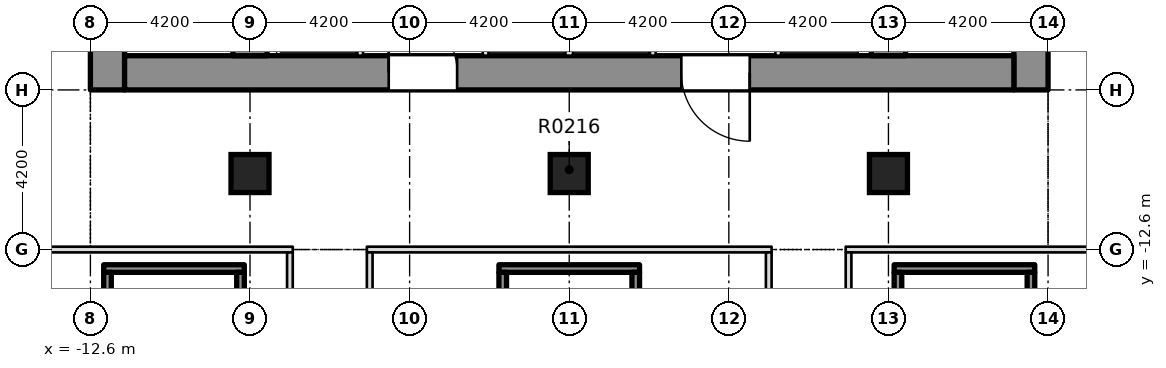
"""IFC4 building model, lengths in metres.
Left out: names, types, materials, properties, quantities, classifications, styles, units other than length and angle.
Written with IfcOpenShell. Run it as: python <this file> out.ifc"""

import sys

from ifc_helpers import new_model, si_unit, direction, frame, frame_2d, origin, origin_2d, place, context, subcontext, project, spatial, rectangle, extrude, element, fill, save


model = new_model("IFC4")
c1 = context("Model", 3, precision=1e-05, world=origin(), true_north=direction((0.0, 1.0)))
c2 = subcontext(c1, "Body", "Model", "MODEL_VIEW")
j1 = project(units=[si_unit("LENGTHUNIT", "METRE"), si_unit("PLANEANGLEUNIT", "RADIAN")], contexts=[c1])
p1 = place(None, origin())
s1 = spatial("IfcSite", under=j1, at=p1, CompositionType="ELEMENT")
p2 = place(p1, origin())
s2 = spatial("IfcBuilding", under=s1, at=p2, CompositionType="ELEMENT")
p3 = place(p2, frame((0.0, 0.0, 12.5)))
s3 = spatial("IfcBuildingStorey", under=s2, at=p3, CompositionType="ELEMENT", Elevation=12.5)
p4 = place(p3, frame((12.15, -8.4, -0.4), z_axis=(0.0, 0.0, 1.0), x_axis=(0.0, 1.0, 0.0)))
e1 = element("IfcWall", 1, at=p4, inside=s3, PredefinedType="SHEAR", context=c2, shape_type="SweptSolid", body=[
    extrude(rectangle(XDim=30.15, YDim=0.9, at=frame_2d((15.075, 0.0))), origin(), (0.0, 0.0, 1.0), 7.5),
])
p5 = place(p4, frame((3.425, 0.0, 0.4)))
e2 = element("IfcOpeningElement", 2, at=p5, cuts=e1, PredefinedType="OPENING", context=c2, shape_type="SweptSolid", body=[
    extrude(rectangle(XDim=0.95, YDim=2.1, at=frame_2d((0.475, 1.05))), frame((0.0, 0.46, 0.0), z_axis=(0.0, -1.0, 0.0), x_axis=(1.0, 0.0, 0.0)), (0.0, 0.0, 1.0), 0.92),
])
p6 = place(p4, frame((8.075, 0.0, 0.4)))
e3 = element("IfcOpeningElement", 3, at=p6, cuts=e1, PredefinedType="OPENING", context=c2, shape_type="SweptSolid", body=[
    extrude(rectangle(XDim=0.95, YDim=2.1, at=frame_2d((0.475, 1.05))), frame((0.0, 0.46, 0.0), z_axis=(0.0, -1.0, 0.0), x_axis=(1.0, 0.0, 0.0)), (0.0, 0.0, 1.0), 0.92),
])
p7 = place(p4, frame((11.425, 0.0, 0.4)))
e4 = element("IfcOpeningElement", 4, at=p7, cuts=e1, PredefinedType="OPENING", context=c2, shape_type="SweptSolid", body=[
    extrude(rectangle(XDim=0.95, YDim=2.1, at=frame_2d((0.475, 1.05))), frame((0.0, 0.46, 0.0), z_axis=(0.0, -1.0, 0.0), x_axis=(1.0, 0.0, 0.0)), (0.0, 0.0, 1.0), 0.92),
])
p8 = place(p4, frame((15.625, 0.0, 0.4)))
e5 = element("IfcOpeningElement", 5, at=p8, cuts=e1, PredefinedType="OPENING", context=c2, shape_type="SweptSolid", body=[
    extrude(rectangle(XDim=0.95, YDim=2.1, at=frame_2d((0.475, 1.05))), frame((0.0, 0.46, 0.0), z_axis=(0.0, -1.0, 0.0), x_axis=(1.0, 0.0, 0.0)), (0.0, 0.0, 1.0), 0.92),
])
p9 = place(p4, frame((22.725, 0.0, 0.4)))
e6 = element("IfcOpeningElement", 6, at=p9, cuts=e1, PredefinedType="OPENING", context=c2, shape_type="SweptSolid", body=[
    extrude(rectangle(XDim=0.95, YDim=2.1, at=frame_2d((0.475, 1.05))), frame((0.0, 0.46, 0.0), z_axis=(0.0, -1.0, 0.0), x_axis=(1.0, 0.0, 0.0)), (0.0, 0.0, 1.0), 0.92),
])
p10 = place(p4, frame((26.75, 0.0, 0.4)))
e7 = element("IfcOpeningElement", 7, at=p10, cuts=e1, PredefinedType="OPENING", context=c2, shape_type="SweptSolid", body=[
    extrude(rectangle(XDim=0.95, YDim=2.1, at=frame_2d((0.475, 1.05))), frame((0.0, 0.46, 0.0), z_axis=(0.0, -1.0, 0.0), x_axis=(1.0, 0.0, 0.0)), (0.0, 0.0, 1.0), 0.92),
])
p11 = place(p4, frame((19.3, 0.0, 0.4)))
e8 = element("IfcOpeningElement", 8, at=p11, cuts=e1, PredefinedType="OPENING", context=c2, shape_type="SweptSolid", body=[
    extrude(rectangle(XDim=1.2, YDim=2.1, at=frame_2d((0.6, 1.05))), frame((0.0, 0.46, 0.0), z_axis=(0.0, -1.0, 0.0), x_axis=(1.0, 0.0, 0.0)), (0.0, 0.0, 1.0), 0.92),
])
p12 = place(p3, frame((-12.15, -8.4, -0.4), z_axis=(0.0, 0.0, 1.0), x_axis=(0.0, 1.0, 0.0)))
e9 = element("IfcWall", 9, at=p12, inside=s3, PredefinedType="SHEAR", context=c2, shape_type="SweptSolid", body=[
    extrude(rectangle(XDim=30.15, YDim=0.9, at=frame_2d((15.075, 0.0))), origin(), (0.0, 0.0, 1.0), 7.5),
])
p13 = place(p12, frame((2.925, 0.0, 0.4)))
e10 = element("IfcOpeningElement", 10, at=p13, cuts=e9, PredefinedType="OPENING", context=c2, shape_type="SweptSolid", body=[
    extrude(rectangle(XDim=0.95, YDim=2.1, at=frame_2d((0.475, 1.05))), frame((0.0, 0.46, 0.0), z_axis=(0.0, -1.0, 0.0), x_axis=(1.0, 0.0, 0.0)), (0.0, 0.0, 1.0), 0.92),
])
p14 = place(p12, frame((7.025, 0.0, 0.4)))
e11 = element("IfcOpeningElement", 11, at=p14, cuts=e9, PredefinedType="OPENING", context=c2, shape_type="SweptSolid", body=[
    extrude(rectangle(XDim=0.95, YDim=2.1, at=frame_2d((0.475, 1.05))), frame((0.0, 0.46, 0.0), z_axis=(0.0, -1.0, 0.0), x_axis=(1.0, 0.0, 0.0)), (0.0, 0.0, 1.0), 0.92),
])
p15 = place(p12, frame((10.875, 0.0, 0.4)))
e12 = element("IfcOpeningElement", 12, at=p15, cuts=e9, PredefinedType="OPENING", context=c2, shape_type="SweptSolid", body=[
    extrude(rectangle(XDim=0.95, YDim=2.1, at=frame_2d((0.475, 1.05))), frame((0.0, 0.46, 0.0), z_axis=(0.0, -1.0, 0.0), x_axis=(1.0, 0.0, 0.0)), (0.0, 0.0, 1.0), 0.92),
])
p16 = place(p12, frame((15.625, 0.0, 0.4)))
e13 = element("IfcOpeningElement", 13, at=p16, cuts=e9, PredefinedType="OPENING", context=c2, shape_type="SweptSolid", body=[
    extrude(rectangle(XDim=0.95, YDim=2.1, at=frame_2d((0.475, 1.05))), frame((0.0, 0.46, 0.0), z_axis=(0.0, -1.0, 0.0), x_axis=(1.0, 0.0, 0.0)), (0.0, 0.0, 1.0), 0.92),
])
p17 = place(p12, frame((24.75, 0.0, 0.4)))
e14 = element("IfcOpeningElement", 14, at=p17, cuts=e9, PredefinedType="OPENING", context=c2, shape_type="SweptSolid", body=[
    extrude(rectangle(XDim=0.95, YDim=2.1, at=frame_2d((0.475, 1.05))), frame((0.0, 0.46, 0.0), z_axis=(0.0, -1.0, 0.0), x_axis=(1.0, 0.0, 0.0)), (0.0, 0.0, 1.0), 0.92),
])
p18 = place(p12, frame((19.3, 0.0, 0.4)))
e15 = element("IfcOpeningElement", 15, at=p18, cuts=e9, PredefinedType="OPENING", context=c2, shape_type="SweptSolid", body=[
    extrude(rectangle(XDim=1.2, YDim=2.1, at=frame_2d((0.6, 1.05))), frame((0.0, 0.46, 0.0), z_axis=(0.0, -1.0, 0.0), x_axis=(1.0, 0.0, 0.0)), (0.0, 0.0, 1.0), 0.92),
])
p19 = place(p3, frame((-11.7, -7.95, -0.4), z_axis=(0.0, 0.0, 1.0), x_axis=(1.0, 0.0, 0.0)))
e16 = element("IfcWall", 16, at=p19, inside=s3, PredefinedType="SHEAR", context=c2, shape_type="SweptSolid", body=[
    extrude(rectangle(XDim=23.4, YDim=0.9, at=frame_2d((11.7, 0.0))), origin(), (0.0, 0.0, 1.0), 7.5),
])
p20 = place(p19, frame((6.95, 0.0, 0.4)))
e17 = element("IfcOpeningElement", 17, at=p20, cuts=e16, PredefinedType="OPENING", context=c2, shape_type="SweptSolid", body=[
    extrude(rectangle(XDim=1.8, YDim=2.1, at=frame_2d((0.9, 1.05))), frame((0.0, 0.46, 0.0), z_axis=(0.0, -1.0, 0.0), x_axis=(1.0, 0.0, 0.0)), (0.0, 0.0, 1.0), 0.92),
])
p21 = place(p19, frame((14.65, 0.0, 0.4)))
e18 = element("IfcOpeningElement", 18, at=p21, cuts=e16, PredefinedType="OPENING", context=c2, shape_type="SweptSolid", body=[
    extrude(rectangle(XDim=1.8, YDim=2.1, at=frame_2d((0.9, 1.05))), frame((0.0, 0.46, 0.0), z_axis=(0.0, -1.0, 0.0), x_axis=(1.0, 0.0, 0.0)), (0.0, 0.0, 1.0), 0.92),
])
p22 = place(p3, frame((-8.4, -7.5, -0.4), z_axis=(0.0, 0.0, 1.0), x_axis=(0.0, 1.0, 0.0)))
e19 = element("IfcWall", 19, at=p22, inside=s3, PredefinedType="SHEAR", context=c2, shape_type="SweptSolid", body=[
    extrude(rectangle(XDim=28.35, YDim=0.9, at=frame_2d((14.175, 0.0))), origin(), (0.0, 0.0, 1.0), 7.5),
])
p23 = place(p22, frame((18.4, 0.0, 0.4)))
e20 = element("IfcOpeningElement", 20, at=p23, cuts=e19, PredefinedType="OPENING", context=c2, shape_type="SweptSolid", body=[
    extrude(rectangle(XDim=1.2, YDim=2.1, at=frame_2d((0.6, 1.05))), frame((0.0, 0.46, 0.0), z_axis=(0.0, -1.0, 0.0), x_axis=(1.0, 0.0, 0.0)), (0.0, 0.0, 1.0), 0.92),
])
p24 = place(p3, frame((8.4, -7.5, -0.4), z_axis=(0.0, 0.0, 1.0), x_axis=(0.0, 1.0, 0.0)))
e21 = element("IfcWall", 21, at=p24, inside=s3, PredefinedType="SHEAR", context=c2, shape_type="SweptSolid", body=[
    extrude(rectangle(XDim=28.35, YDim=0.9, at=frame_2d((14.175, 0.0))), origin(), (0.0, 0.0, 1.0), 7.5),
])
p25 = place(p24, frame((18.4, 0.0, 0.4)))
e22 = element("IfcOpeningElement", 22, at=p25, cuts=e21, PredefinedType="OPENING", context=c2, shape_type="SweptSolid", body=[
    extrude(rectangle(XDim=1.2, YDim=2.1, at=frame_2d((0.6, 1.05))), frame((0.0, 0.46, 0.0), z_axis=(0.0, -1.0, 0.0), x_axis=(1.0, 0.0, 0.0)), (0.0, 0.0, 1.0), 0.92),
])
for number, where, z_axis, x_axis in (
    (23, (-8.4, -10.6, -0.4), (0.0, 0.0, 1.0), (1.0, 0.0, 0.0)),
    (24, (0.0, -10.6, -0.4), (0.0, 0.0, 1.0), (1.0, 0.0, 0.0)),
    (25, (8.4, -10.6, -0.4), (0.0, 0.0, 1.0), (1.0, 0.0, 0.0)),
):
    element("IfcColumn", number, at=place(p3, frame(where, z_axis=z_axis, x_axis=x_axis)), inside=s3, PredefinedType="COLUMN", context=c2, shape_type="SweptSolid", body=[
        extrude(rectangle(XDim=1.0, YDim=1.0, at=origin_2d()), origin(), (0.0, 0.0, 1.0), 7.5),
    ])
p26 = place(p3, frame((-16.9, -12.6, 0.0), z_axis=(0.0, 0.0, 1.0), x_axis=(1.0, 0.0, 0.0)))
e26 = element("IfcWall", 26, at=p26, inside=s3, PredefinedType="PARTITIONING", context=c2, shape_type="SweptSolid", body=[
    extrude(rectangle(XDim=9.625, YDim=0.15, at=frame_2d((4.812, 0.0))), origin(), (0.0, 0.0, 1.0), 7.1),
])
p27 = place(p3, frame((-5.325, -12.6, 0.0), z_axis=(0.0, 0.0, 1.0), x_axis=(1.0, 0.0, 0.0)))
e27 = element("IfcWall", 27, at=p27, inside=s3, PredefinedType="PARTITIONING", context=c2, shape_type="SweptSolid", body=[
    extrude(rectangle(XDim=10.65, YDim=0.15, at=frame_2d((5.325, 0.0))), origin(), (0.0, 0.0, 1.0), 7.1),
])
p28 = place(p3, frame((7.275, -12.6, 0.0), z_axis=(0.0, 0.0, 1.0), x_axis=(1.0, 0.0, 0.0)))
e28 = element("IfcWall", 28, at=p28, inside=s3, PredefinedType="PARTITIONING", context=c2, shape_type="SweptSolid", body=[
    extrude(rectangle(XDim=9.625, YDim=0.15, at=frame_2d((4.812, 0.0))), origin(), (0.0, 0.0, 1.0), 7.1),
])
for number, where, z_axis, x_axis in (
    (29, (-7.35, -18.125, 0.0), (0.0, 0.0, 1.0), (0.0, 1.0, 0.0)),
    (30, (-5.25, -18.125, 0.0), (0.0, 0.0, 1.0), (0.0, 1.0, 0.0)),
    (31, (5.25, -18.125, 0.0), (0.0, 0.0, 1.0), (0.0, 1.0, 0.0)),
    (32, (7.35, -18.125, 0.0), (0.0, 0.0, 1.0), (0.0, 1.0, 0.0)),
):
    element("IfcWall", number, at=place(p3, frame(where, z_axis=z_axis, x_axis=x_axis)), inside=s3, PredefinedType="PARTITIONING", context=c2, shape_type="SweptSolid", body=[
        extrude(rectangle(XDim=5.45, YDim=0.15, at=frame_2d((2.725, 0.0))), origin(), (0.0, 0.0, 1.0), 7.1),
    ])
p29 = place(p3, frame((-5.5, -7.499, 0.0), z_axis=(0.0, 0.0, 1.0), x_axis=(0.0, 1.0, 0.0)))
e33 = element("IfcWall", 33, at=p29, inside=s3, PredefinedType="PARTITIONING", context=c2, shape_type="SweptSolid", body=[
    extrude(rectangle(XDim=11.924, YDim=0.15, at=frame_2d((5.962, 0.0))), origin(), (0.0, 0.0, 1.0), 7.1),
])
p30 = place(p29, frame((0.949, 0.0, 0.0)))
e34 = element("IfcOpeningElement", 34, at=p30, cuts=e33, PredefinedType="OPENING", context=c2, shape_type="SweptSolid", body=[
    extrude(rectangle(XDim=1.1, YDim=2.1, at=frame_2d((0.55, 1.05))), frame((0.0, 0.085, 0.0), z_axis=(0.0, -1.0, 0.0), x_axis=(1.0, 0.0, 0.0)), (0.0, 0.0, 1.0), 0.17),
])
p31 = place(p29, frame((3.949, 0.0, 0.0)))
e35 = element("IfcOpeningElement", 35, at=p31, cuts=e33, PredefinedType="OPENING", context=c2, shape_type="SweptSolid", body=[
    extrude(rectangle(XDim=1.1, YDim=2.1, at=frame_2d((0.55, 1.05))), frame((0.0, 0.085, 0.0), z_axis=(0.0, -1.0, 0.0), x_axis=(1.0, 0.0, 0.0)), (0.0, 0.0, 1.0), 0.17),
])
p32 = place(p29, frame((6.949, 0.0, 0.0)))
e36 = element("IfcOpeningElement", 36, at=p32, cuts=e33, PredefinedType="OPENING", context=c2, shape_type="SweptSolid", body=[
    extrude(rectangle(XDim=1.1, YDim=2.1, at=frame_2d((0.55, 1.05))), frame((0.0, 0.085, 0.0), z_axis=(0.0, -1.0, 0.0), x_axis=(1.0, 0.0, 0.0)), (0.0, 0.0, 1.0), 0.17),
])
p33 = place(p29, frame((9.949, 0.0, 0.0)))
e37 = element("IfcOpeningElement", 37, at=p33, cuts=e33, PredefinedType="OPENING", context=c2, shape_type="SweptSolid", body=[
    extrude(rectangle(XDim=1.1, YDim=2.1, at=frame_2d((0.55, 1.05))), frame((0.0, 0.085, 0.0), z_axis=(0.0, -1.0, 0.0), x_axis=(1.0, 0.0, 0.0)), (0.0, 0.0, 1.0), 0.17),
])
p34 = place(p3, frame((-2.2, -7.499, 0.0), z_axis=(0.0, 0.0, 1.0), x_axis=(0.0, 1.0, 0.0)))
e38 = element("IfcWall", 38, at=p34, inside=s3, PredefinedType="PARTITIONING", context=c2, shape_type="SweptSolid", body=[
    extrude(rectangle(XDim=11.924, YDim=0.15, at=frame_2d((5.962, 0.0))), origin(), (0.0, 0.0, 1.0), 7.1),
])
p35 = place(p34, frame((0.949, 0.0, 0.0)))
e39 = element("IfcOpeningElement", 39, at=p35, cuts=e38, PredefinedType="OPENING", context=c2, shape_type="SweptSolid", body=[
    extrude(rectangle(XDim=1.1, YDim=2.1, at=frame_2d((0.55, 1.05))), frame((0.0, 0.085, 0.0), z_axis=(0.0, -1.0, 0.0), x_axis=(1.0, 0.0, 0.0)), (0.0, 0.0, 1.0), 0.17),
])
p36 = place(p34, frame((3.949, 0.0, 0.0)))
e40 = element("IfcOpeningElement", 40, at=p36, cuts=e38, PredefinedType="OPENING", context=c2, shape_type="SweptSolid", body=[
    extrude(rectangle(XDim=1.1, YDim=2.1, at=frame_2d((0.55, 1.05))), frame((0.0, 0.085, 0.0), z_axis=(0.0, -1.0, 0.0), x_axis=(1.0, 0.0, 0.0)), (0.0, 0.0, 1.0), 0.17),
])
p37 = place(p34, frame((6.949, 0.0, 0.0)))
e41 = element("IfcOpeningElement", 41, at=p37, cuts=e38, PredefinedType="OPENING", context=c2, shape_type="SweptSolid", body=[
    extrude(rectangle(XDim=1.1, YDim=2.1, at=frame_2d((0.55, 1.05))), frame((0.0, 0.085, 0.0), z_axis=(0.0, -1.0, 0.0), x_axis=(1.0, 0.0, 0.0)), (0.0, 0.0, 1.0), 0.17),
])
p38 = place(p34, frame((9.949, 0.0, 0.0)))
e42 = element("IfcOpeningElement", 42, at=p38, cuts=e38, PredefinedType="OPENING", context=c2, shape_type="SweptSolid", body=[
    extrude(rectangle(XDim=1.1, YDim=2.1, at=frame_2d((0.55, 1.05))), frame((0.0, 0.085, 0.0), z_axis=(0.0, -1.0, 0.0), x_axis=(1.0, 0.0, 0.0)), (0.0, 0.0, 1.0), 0.17),
])
p39 = place(p3, frame((0.0, -7.499, 0.0), z_axis=(0.0, 0.0, 1.0), x_axis=(0.0, 1.0, 0.0)))
e43 = element("IfcWall", 43, at=p39, inside=s3, PredefinedType="PARTITIONING", context=c2, shape_type="SweptSolid", body=[
    extrude(rectangle(XDim=11.924, YDim=0.2, at=frame_2d((5.962, 0.0))), origin(), (0.0, 0.0, 1.0), 7.1),
])
p40 = place(p3, frame((2.2, -7.499, 0.0), z_axis=(0.0, 0.0, 1.0), x_axis=(0.0, 1.0, 0.0)))
e44 = element("IfcWall", 44, at=p40, inside=s3, PredefinedType="PARTITIONING", context=c2, shape_type="SweptSolid", body=[
    extrude(rectangle(XDim=11.924, YDim=0.15, at=frame_2d((5.962, 0.0))), origin(), (0.0, 0.0, 1.0), 7.1),
])
p41 = place(p3, frame((5.5, -7.499, 0.0), z_axis=(0.0, 0.0, 1.0), x_axis=(0.0, 1.0, 0.0)))
e45 = element("IfcWall", 45, at=p41, inside=s3, PredefinedType="PARTITIONING", context=c2, shape_type="SweptSolid", body=[
    extrude(rectangle(XDim=11.924, YDim=0.15, at=frame_2d((5.962, 0.0))), origin(), (0.0, 0.0, 1.0), 7.1),
])
p42 = place(p41, frame((6.949, 0.0, 0.0)))
e46 = element("IfcOpeningElement", 46, at=p42, cuts=e45, PredefinedType="OPENING", context=c2, shape_type="SweptSolid", body=[
    extrude(rectangle(XDim=1.1, YDim=2.1, at=frame_2d((0.55, 1.05))), frame((0.0, 0.085, 0.0), z_axis=(0.0, -1.0, 0.0), x_axis=(1.0, 0.0, 0.0)), (0.0, 0.0, 1.0), 0.17),
])
p43 = place(p41, frame((9.949, 0.0, 0.0)))
e47 = element("IfcOpeningElement", 47, at=p43, cuts=e45, PredefinedType="OPENING", context=c2, shape_type="SweptSolid", body=[
    extrude(rectangle(XDim=1.1, YDim=2.1, at=frame_2d((0.55, 1.05))), frame((0.0, 0.085, 0.0), z_axis=(0.0, -1.0, 0.0), x_axis=(1.0, 0.0, 0.0)), (0.0, 0.0, 1.0), 0.17),
])
p44 = place(p3, frame((-12.25, -13.1, 0.0), z_axis=(0.0, 0.0, 1.0), x_axis=(1.0, 0.0, 0.0)))
e48 = element("IfcWall", 48, at=p44, inside=s3, PredefinedType="SOLIDWALL", context=c2, shape_type="SweptSolid", body=[
    extrude(rectangle(XDim=3.7, YDim=0.2, at=frame_2d((1.85, 0.0))), origin(), (0.0, 0.0, 1.0), 7.1),
])
p45 = place(p3, frame((-12.15, -19.8, 0.0), z_axis=(0.0, 0.0, 1.0), x_axis=(0.0, 1.0, 0.0)))
e49 = element("IfcWall", 49, at=p45, inside=s3, PredefinedType="SOLIDWALL", context=c2, shape_type="SweptSolid", body=[
    extrude(rectangle(XDim=6.6, YDim=0.2, at=frame_2d((3.3, 0.0))), origin(), (0.0, 0.0, 1.0), 7.1),
])
p46 = place(p3, frame((-8.65, -20.3, 0.0), z_axis=(0.0, 0.0, 1.0), x_axis=(0.0, 1.0, 0.0)))
e50 = element("IfcWall", 50, at=p46, inside=s3, PredefinedType="SOLIDWALL", context=c2, shape_type="SweptSolid", body=[
    extrude(rectangle(XDim=7.1, YDim=0.2, at=frame_2d((3.55, 0.0))), origin(), (0.0, 0.0, 1.0), 7.1),
])
p47 = place(p3, frame((-1.85, -13.1, 0.0), z_axis=(0.0, 0.0, 1.0), x_axis=(1.0, 0.0, 0.0)))
e51 = element("IfcWall", 51, at=p47, inside=s3, PredefinedType="SOLIDWALL", context=c2, shape_type="SweptSolid", body=[
    extrude(rectangle(XDim=3.7, YDim=0.2, at=frame_2d((1.85, 0.0))), origin(), (0.0, 0.0, 1.0), 7.1),
])
for number, where, z_axis, x_axis in (
    (52, (-1.75, -19.8, 0.0), (0.0, 0.0, 1.0), (0.0, 1.0, 0.0)),
    (53, (1.75, -19.8, 0.0), (0.0, 0.0, 1.0), (0.0, 1.0, 0.0)),
):
    element("IfcWall", number, at=place(p3, frame(where, z_axis=z_axis, x_axis=x_axis)), inside=s3, PredefinedType="SOLIDWALL", context=c2, shape_type="SweptSolid", body=[
        extrude(rectangle(XDim=6.6, YDim=0.2, at=frame_2d((3.3, 0.0))), origin(), (0.0, 0.0, 1.0), 7.1),
    ])
p48 = place(p3, frame((8.55, -13.1, 0.0), z_axis=(0.0, 0.0, 1.0), x_axis=(1.0, 0.0, 0.0)))
e54 = element("IfcWall", 54, at=p48, inside=s3, PredefinedType="SOLIDWALL", context=c2, shape_type="SweptSolid", body=[
    extrude(rectangle(XDim=3.7, YDim=0.2, at=frame_2d((1.85, 0.0))), origin(), (0.0, 0.0, 1.0), 7.1),
])
p49 = place(p3, frame((8.65, -20.3, 0.0), z_axis=(0.0, 0.0, 1.0), x_axis=(0.0, 1.0, 0.0)))
e55 = element("IfcWall", 55, at=p49, inside=s3, PredefinedType="SOLIDWALL", context=c2, shape_type="SweptSolid", body=[
    extrude(rectangle(XDim=7.1, YDim=0.2, at=frame_2d((3.55, 0.0))), origin(), (0.0, 0.0, 1.0), 7.1),
])
p50 = place(p3, frame((12.15, -19.8, 0.0), z_axis=(0.0, 0.0, 1.0), x_axis=(0.0, 1.0, 0.0)))
e56 = element("IfcWall", 56, at=p50, inside=s3, PredefinedType="SOLIDWALL", context=c2, shape_type="SweptSolid", body=[
    extrude(rectangle(XDim=6.6, YDim=0.2, at=frame_2d((3.3, 0.0))), origin(), (0.0, 0.0, 1.0), 7.1),
])
p51 = place(p20, origin())
e57 = element("IfcDoor", 57, at=p51, inside=s3, OperationType="SINGLE_SWING_LEFT", PredefinedType="DOOR", context=c2, shape_type="SweptSolid", body=[
    extrude(rectangle(XDim=1.8, YDim=2.1, at=frame_2d((0.9, 1.05))), frame((0.0, 0.025, 0.0), z_axis=(0.0, -1.0, 0.0), x_axis=(1.0, 0.0, 0.0)), (0.0, 0.0, 1.0), 0.05),
])
fill(e17, e57)
p52 = place(p21, origin())
e58 = element("IfcDoor", 58, at=p52, inside=s3, OperationType="SINGLE_SWING_LEFT", PredefinedType="DOOR", context=c2, shape_type="SweptSolid", body=[
    extrude(rectangle(XDim=1.8, YDim=2.1, at=frame_2d((0.9, 1.05))), frame((0.0, 0.025, 0.0), z_axis=(0.0, -1.0, 0.0), x_axis=(1.0, 0.0, 0.0)), (0.0, 0.0, 1.0), 0.05),
])
fill(e18, e58)
save(model, sys.argv[1])
